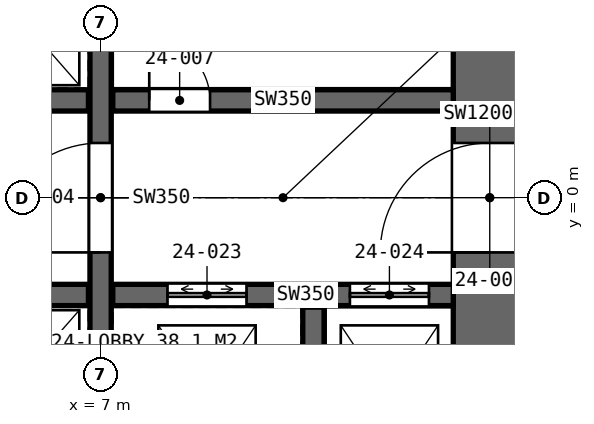
"""IFC4 building model, lengths in metres.
Left out: names, types, materials, properties, quantities, classifications, styles, units other than length and angle.
Written with IfcOpenShell. Run it as: python <this file> out.ifc"""

import sys

from ifc_helpers import new_model, si_unit, direction, frame, frame_2d, origin, place, context, subcontext, project, spatial, rectangle, extrude, element, fill, save


model = new_model("IFC4")
c1 = context("Model", 3, precision=1e-05, world=origin(), true_north=direction((0.0, 1.0)))
c2 = subcontext(c1, "Body", "Model", "MODEL_VIEW")
j1 = project(units=[si_unit("LENGTHUNIT", "METRE"), si_unit("PLANEANGLEUNIT", "RADIAN")], contexts=[c1])
p1 = place(None, origin())
s1 = spatial("IfcSite", under=j1, at=p1, CompositionType="ELEMENT")
p2 = place(p1, origin())
s2 = spatial("IfcBuilding", under=s1, at=p2, CompositionType="ELEMENT")
p3 = place(p2, frame((0.0, 0.0, 117.6)))
s3 = spatial("IfcBuildingStorey", under=s2, at=p3, CompositionType="ELEMENT", Elevation=117.6)
p4 = place(p3, frame((13.4, -8.8, 0.0), z_axis=(0.0, 0.0, 1.0), x_axis=(0.0, 1.0, 0.0)))
e1 = element("IfcWall", 1, at=p4, inside=s3, PredefinedType="SHEAR", context=c2, shape_type="SweptSolid", body=[
    extrude(rectangle(XDim=17.6, YDim=1.2, at=frame_2d((8.8, 0.0))), origin(), (0.0, 0.0, 1.0), 4.2),
])
p5 = place(p4, frame((7.9, 0.0, 0.0)))
e2 = element("IfcOpeningElement", 2, at=p5, cuts=e1, PredefinedType="OPENING", context=c2, shape_type="SweptSolid", body=[
    extrude(rectangle(XDim=1.8, YDim=2.4, at=frame_2d((0.9, 1.2))), frame((0.0, 0.61, 0.0), z_axis=(0.0, -1.0, 0.0), x_axis=(1.0, 0.0, 0.0)), (0.0, 0.0, 1.0), 1.22),
])
p6 = place(p3, frame((7.0, -8.8, 0.0), z_axis=(0.0, 0.0, 1.0), x_axis=(0.0, 1.0, 0.0)))
e3 = element("IfcWall", 3, at=p6, inside=s3, PredefinedType="SHEAR", context=c2, shape_type="SweptSolid", body=[
    extrude(rectangle(XDim=17.6, YDim=0.35, at=frame_2d((8.8, 0.0))), origin(), (0.0, 0.0, 1.0), 4.2),
])
p7 = place(p6, frame((7.9, 0.0, 0.0)))
e4 = element("IfcOpeningElement", 4, at=p7, cuts=e3, PredefinedType="OPENING", context=c2, shape_type="SweptSolid", body=[
    extrude(rectangle(XDim=1.8, YDim=2.4, at=frame_2d((0.9, 1.2))), frame((0.0, 0.185, 0.0), z_axis=(0.0, -1.0, 0.0), x_axis=(1.0, 0.0, 0.0)), (0.0, 0.0, 1.0), 0.37),
])
p8 = place(p3, frame((-6.8, 1.6, 0.0), z_axis=(0.0, 0.0, 1.0), x_axis=(1.0, 0.0, 0.0)))
e5 = element("IfcWall", 5, at=p8, inside=s3, PredefinedType="SHEAR", context=c2, shape_type="SweptSolid", body=[
    extrude(rectangle(XDim=13.6, YDim=0.35, at=frame_2d((6.8, 0.0))), origin(), (0.0, 0.0, 1.0), 4.2),
])
p9 = place(p8, frame((2.365, 0.0, 0.0)))
e6 = element("IfcOpeningElement", 6, at=p9, cuts=e5, PredefinedType="OPENING", context=c2, shape_type="SweptSolid", body=[
    extrude(rectangle(XDim=1.0, YDim=2.4, at=frame_2d((0.5, 1.2))), frame((0.0, 0.185, 0.0), z_axis=(0.0, -1.0, 0.0), x_axis=(1.0, 0.0, 0.0)), (0.0, 0.0, 1.0), 0.37),
])
p10 = place(p8, frame((7.835, 0.0, 0.0)))
e7 = element("IfcOpeningElement", 7, at=p10, cuts=e5, PredefinedType="OPENING", context=c2, shape_type="SweptSolid", body=[
    extrude(rectangle(XDim=1.0, YDim=2.4, at=frame_2d((0.5, 1.2))), frame((0.0, 0.185, 0.0), z_axis=(0.0, -1.0, 0.0), x_axis=(1.0, 0.0, 0.0)), (0.0, 0.0, 1.0), 0.37),
])
p11 = place(p3, frame((-6.8, -1.6, 0.0), z_axis=(0.0, 0.0, 1.0), x_axis=(1.0, 0.0, 0.0)))
e8 = element("IfcWall", 8, at=p11, inside=s3, PredefinedType="SHEAR", context=c2, shape_type="SweptSolid", body=[
    extrude(rectangle(XDim=13.6, YDim=0.35, at=frame_2d((6.8, 0.0))), origin(), (0.0, 0.0, 1.0), 4.2),
])
p12 = place(p11, frame((0.7, 0.0, 0.0)))
e9 = element("IfcOpeningElement", 9, at=p12, cuts=e8, PredefinedType="OPENING", context=c2, shape_type="SweptSolid", body=[
    extrude(rectangle(XDim=1.1, YDim=2.4, at=frame_2d((0.55, 1.2))), frame((0.0, 0.185, 0.0), z_axis=(0.0, -1.0, 0.0), x_axis=(1.0, 0.0, 0.0)), (0.0, 0.0, 1.0), 0.37),
])
p13 = place(p11, frame((3.5, 0.0, 0.0)))
e10 = element("IfcOpeningElement", 10, at=p13, cuts=e8, PredefinedType="OPENING", context=c2, shape_type="SweptSolid", body=[
    extrude(rectangle(XDim=1.1, YDim=2.4, at=frame_2d((0.55, 1.2))), frame((0.0, 0.185, 0.0), z_axis=(0.0, -1.0, 0.0), x_axis=(1.0, 0.0, 0.0)), (0.0, 0.0, 1.0), 0.37),
])
p14 = place(p11, frame((6.3, 0.0, 0.0)))
e11 = element("IfcOpeningElement", 11, at=p14, cuts=e8, PredefinedType="OPENING", context=c2, shape_type="SweptSolid", body=[
    extrude(rectangle(XDim=1.1, YDim=2.4, at=frame_2d((0.55, 1.2))), frame((0.0, 0.185, 0.0), z_axis=(0.0, -1.0, 0.0), x_axis=(1.0, 0.0, 0.0)), (0.0, 0.0, 1.0), 0.37),
])
p15 = place(p11, frame((9.1, 0.0, 0.0)))
e12 = element("IfcOpeningElement", 12, at=p15, cuts=e8, PredefinedType="OPENING", context=c2, shape_type="SweptSolid", body=[
    extrude(rectangle(XDim=1.1, YDim=2.4, at=frame_2d((0.55, 1.2))), frame((0.0, 0.185, 0.0), z_axis=(0.0, -1.0, 0.0), x_axis=(1.0, 0.0, 0.0)), (0.0, 0.0, 1.0), 0.37),
])
p16 = place(p3, frame((7.2, 1.6, 0.0), z_axis=(0.0, 0.0, 1.0), x_axis=(1.0, 0.0, 0.0)))
e13 = element("IfcWall", 13, at=p16, inside=s3, PredefinedType="SHEAR", context=c2, shape_type="SweptSolid", body=[
    extrude(rectangle(XDim=5.6, YDim=0.35, at=frame_2d((2.8, 0.0))), origin(), (0.0, 0.0, 1.0), 4.2),
])
p17 = place(p16, frame((0.6, 0.0, 0.0)))
e14 = element("IfcOpeningElement", 14, at=p17, cuts=e13, PredefinedType="OPENING", context=c2, shape_type="SweptSolid", body=[
    extrude(rectangle(XDim=1.0, YDim=2.4, at=frame_2d((0.5, 1.2))), frame((0.0, 0.185, 0.0), z_axis=(0.0, -1.0, 0.0), x_axis=(1.0, 0.0, 0.0)), (0.0, 0.0, 1.0), 0.37),
])
p18 = place(p3, frame((7.2, -1.6, 0.0), z_axis=(0.0, 0.0, 1.0), x_axis=(1.0, 0.0, 0.0)))
e15 = element("IfcWall", 15, at=p18, inside=s3, PredefinedType="SHEAR", context=c2, shape_type="SweptSolid", body=[
    extrude(rectangle(XDim=5.6, YDim=0.35, at=frame_2d((2.8, 0.0))), origin(), (0.0, 0.0, 1.0), 4.2),
])
p19 = place(p18, frame((0.9, 0.0, 0.0)))
e16 = element("IfcOpeningElement", 16, at=p19, cuts=e15, PredefinedType="OPENING", context=c2, shape_type="SweptSolid", body=[
    extrude(rectangle(XDim=1.3, YDim=2.4, at=frame_2d((0.65, 1.2))), frame((0.0, 0.185, 0.0), z_axis=(0.0, -1.0, 0.0), x_axis=(1.0, 0.0, 0.0)), (0.0, 0.0, 1.0), 0.37),
])
p20 = place(p18, frame((3.9, 0.0, 0.0)))
e17 = element("IfcOpeningElement", 17, at=p20, cuts=e15, PredefinedType="OPENING", context=c2, shape_type="SweptSolid", body=[
    extrude(rectangle(XDim=1.3, YDim=2.4, at=frame_2d((0.65, 1.2))), frame((0.0, 0.185, 0.0), z_axis=(0.0, -1.0, 0.0), x_axis=(1.0, 0.0, 0.0)), (0.0, 0.0, 1.0), 0.37),
])
p21 = place(p3, frame((10.5, -4.8, 0.0), z_axis=(0.0, 0.0, 1.0), x_axis=(0.0, 1.0, 0.0)))
e18 = element("IfcWall", 18, at=p21, inside=s3, PredefinedType="SHEAR", context=c2, shape_type="SweptSolid", body=[
    extrude(rectangle(XDim=3.0, YDim=0.35, at=frame_2d((1.5, 0.0))), origin(), (0.0, 0.0, 1.0), 4.2),
])
p22 = place(p5, origin())
e19 = element("IfcDoor", 19, at=p22, inside=s3, OperationType="DOUBLE_DOOR_SINGLE_SWING", PredefinedType="DOOR", context=c2, shape_type="SweptSolid", body=[
    extrude(rectangle(XDim=1.8, YDim=2.4, at=frame_2d((0.9, 1.2))), frame((0.0, 0.025, 0.0), z_axis=(0.0, -1.0, 0.0), x_axis=(1.0, 0.0, 0.0)), (0.0, 0.0, 1.0), 0.05),
])
fill(e2, e19)
p23 = place(p7, origin())
e20 = element("IfcDoor", 20, at=p23, inside=s3, OperationType="DOUBLE_DOOR_SINGLE_SWING", PredefinedType="DOOR", context=c2, shape_type="SweptSolid", body=[
    extrude(rectangle(XDim=1.8, YDim=2.4, at=frame_2d((0.9, 1.2))), frame((0.0, 0.025, 0.0), z_axis=(0.0, -1.0, 0.0), x_axis=(1.0, 0.0, 0.0)), (0.0, 0.0, 1.0), 0.05),
])
fill(e4, e20)
p24 = place(p17, origin())
e21 = element("IfcDoor", 21, at=p24, inside=s3, OperationType="SINGLE_SWING_LEFT", PredefinedType="DOOR", context=c2, shape_type="SweptSolid", body=[
    extrude(rectangle(XDim=1.0, YDim=2.4, at=frame_2d((0.5, 1.2))), frame((0.0, 0.025, 0.0), z_axis=(0.0, -1.0, 0.0), x_axis=(1.0, 0.0, 0.0)), (0.0, 0.0, 1.0), 0.05),
])
fill(e14, e21)
p25 = place(p19, origin())
e22 = element("IfcDoor", 22, at=p25, inside=s3, OperationType="DOUBLE_DOOR_SLIDING", PredefinedType="DOOR", context=c2, shape_type="SweptSolid", body=[
    extrude(rectangle(XDim=1.3, YDim=2.4, at=frame_2d((0.65, 1.2))), frame((0.0, 0.025, 0.0), z_axis=(0.0, -1.0, 0.0), x_axis=(1.0, 0.0, 0.0)), (0.0, 0.0, 1.0), 0.05),
])
fill(e16, e22)
p26 = place(p20, origin())
e23 = element("IfcDoor", 23, at=p26, inside=s3, OperationType="DOUBLE_DOOR_SLIDING", PredefinedType="DOOR", context=c2, shape_type="SweptSolid", body=[
    extrude(rectangle(XDim=1.3, YDim=2.4, at=frame_2d((0.65, 1.2))), frame((0.0, 0.025, 0.0), z_axis=(0.0, -1.0, 0.0), x_axis=(1.0, 0.0, 0.0)), (0.0, 0.0, 1.0), 0.05),
])
fill(e17, e23)
save(model, sys.argv[1])
